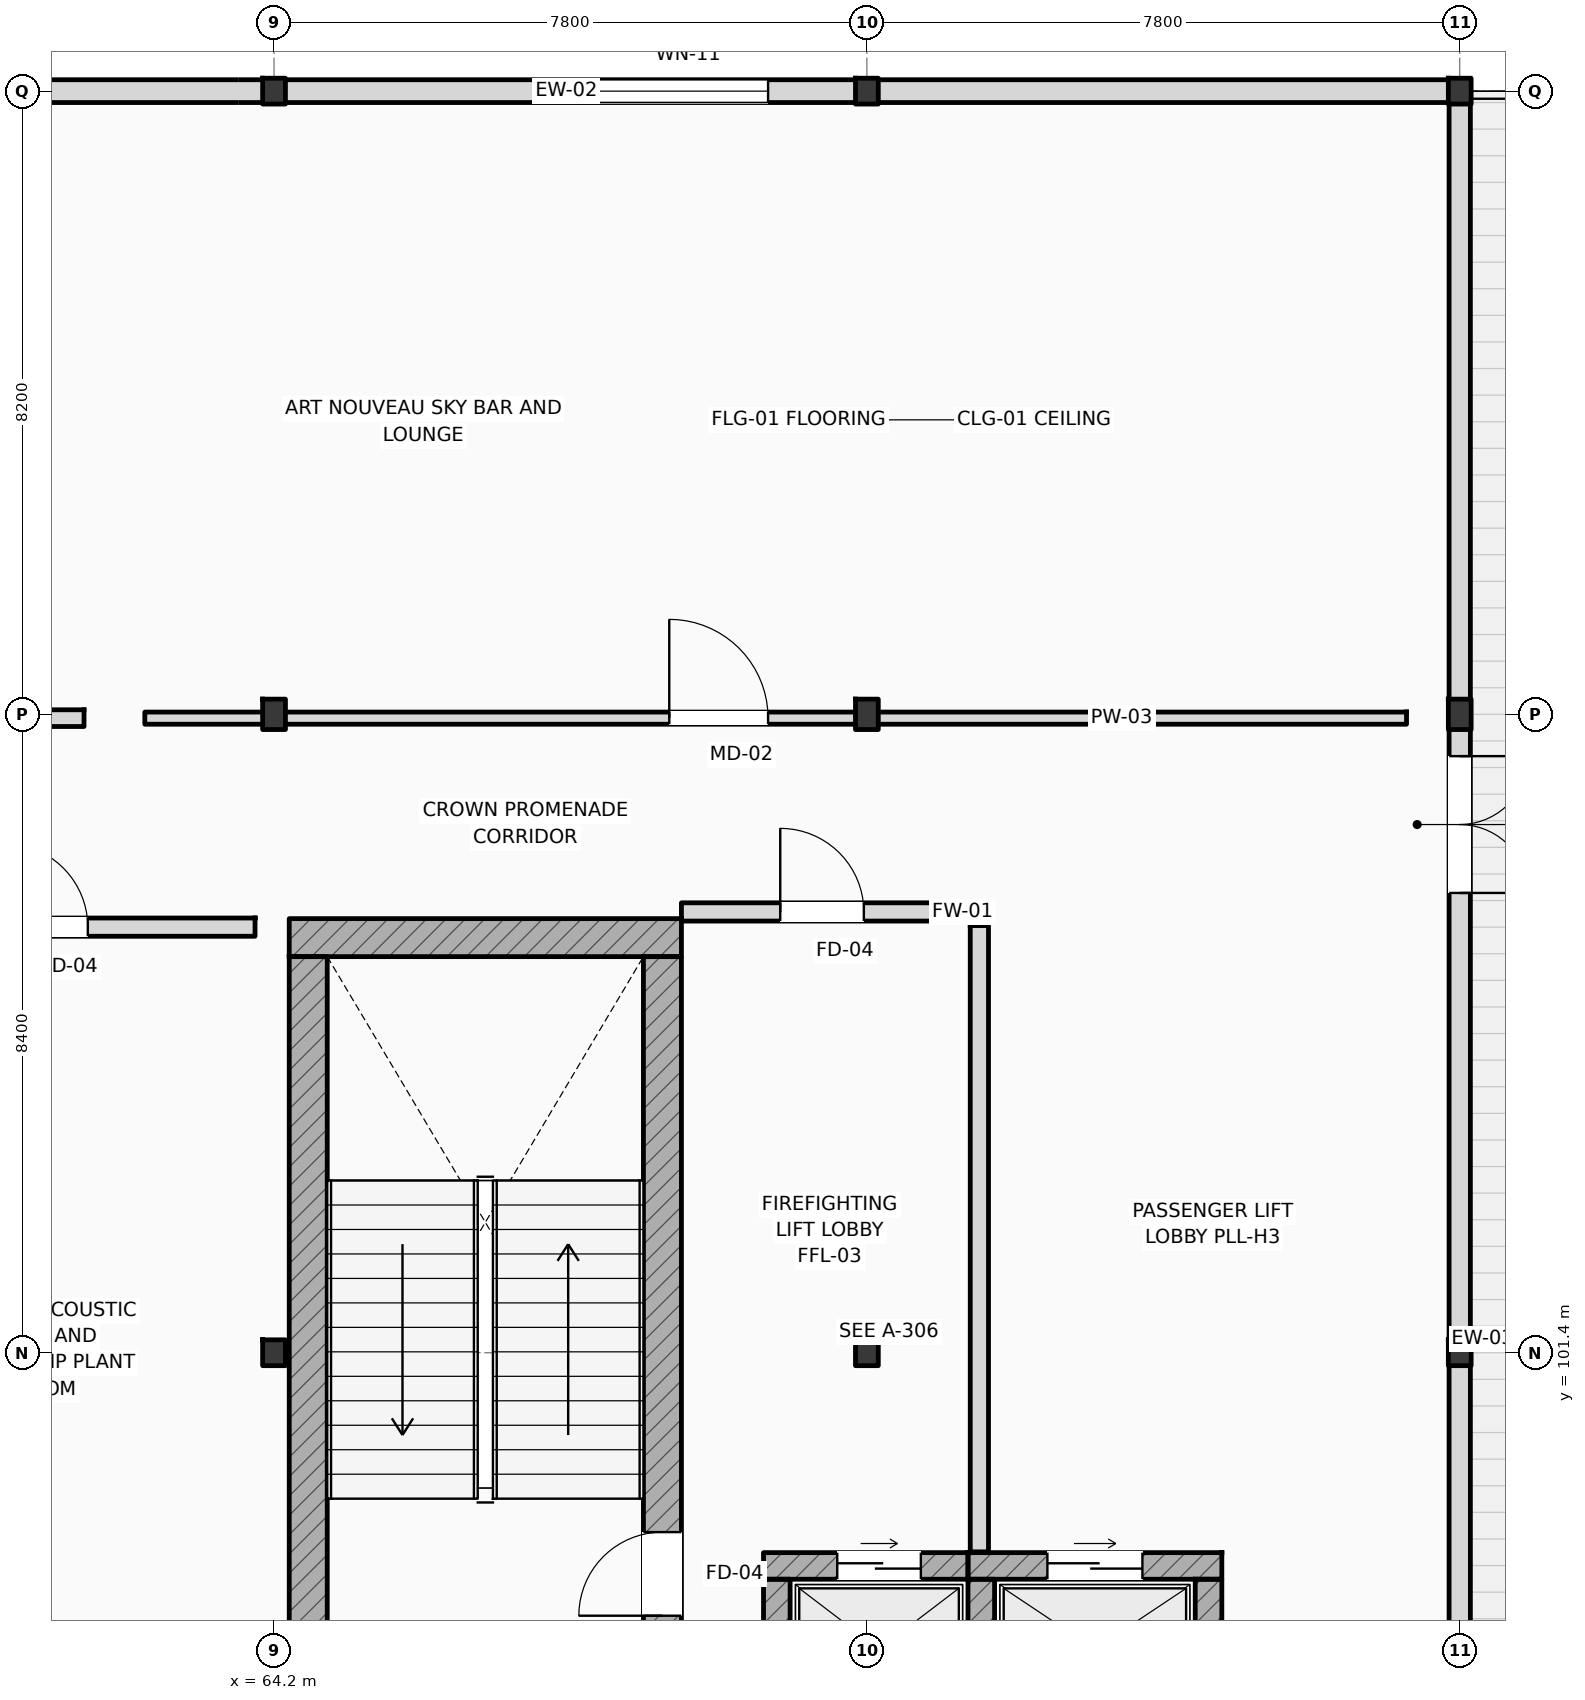
"""IFC4 building model, lengths in metres.
Left out: names, types, materials, properties, quantities, classifications, styles, units other than length and angle.
Written with IfcOpenShell. Run it as: python <this file> out.ifc"""

import sys

from ifc_helpers import new_model, si_unit, direction, frame, frame_2d, origin, origin_2d, place, context, subcontext, project, spatial, rectangle, i_section, extrude, element, fill, save


model = new_model("IFC4")
c1 = context("Model", 3, precision=1e-05, world=origin(), true_north=direction((0.0, 1.0)))
c2 = subcontext(c1, "Body", "Model", "MODEL_VIEW")
j1 = project(units=[si_unit("LENGTHUNIT", "METRE"), si_unit("PLANEANGLEUNIT", "RADIAN")], contexts=[c1])
p1 = place(None, origin())
s1 = spatial("IfcSite", under=j1, at=p1, CompositionType="ELEMENT")
p2 = place(p1, origin())
s2 = spatial("IfcBuilding", under=s1, at=p2, CompositionType="ELEMENT")
p3 = place(p2, frame((0.0, 0.0, 46.8)))
s3 = spatial("IfcBuildingStorey", under=s2, at=p3, CompositionType="ELEMENT", Elevation=46.8)
p4 = place(p3, frame((64.2, 101.4, 0.0), z_axis=(0.0, 0.0, 1.0), x_axis=(1.0, 0.0, 0.0)))
e1 = element("IfcColumn", 1, at=p4, inside=s3, PredefinedType="COLUMN", context=c2, shape_type="SweptSolid", body=[
    extrude(i_section(OverallWidth=0.3, OverallDepth=0.34, WebThickness=0.012, FlangeThickness=0.021, FilletRadius=0.027, at=origin_2d()), origin(), (0.0, 0.0, 1.0), 4.8),
])
p5 = place(p3, frame((64.2, 109.8, 0.0), z_axis=(0.0, 0.0, 1.0), x_axis=(1.0, 0.0, 0.0)))
e2 = element("IfcColumn", 2, at=p5, inside=s3, PredefinedType="COLUMN", context=c2, shape_type="SweptSolid", body=[
    extrude(i_section(OverallWidth=0.3, OverallDepth=0.4, WebThickness=0.013, FlangeThickness=0.024, FilletRadius=0.027, at=origin_2d()), origin(), (0.0, 0.0, 1.0), 4.8),
])
for number, where, z_axis, x_axis in (
    (3, (64.2, 118.0, 0.0), (0.0, 0.0, 1.0), (1.0, 0.0, 0.0)),
    (4, (72.0, 101.4, 0.0), (0.0, 0.0, 1.0), (1.0, 0.0, 0.0)),
):
    element("IfcColumn", number, at=place(p3, frame(where, z_axis=z_axis, x_axis=x_axis)), inside=s3, PredefinedType="COLUMN", context=c2, shape_type="SweptSolid", body=[
        extrude(i_section(OverallWidth=0.3, OverallDepth=0.34, WebThickness=0.012, FlangeThickness=0.021, FilletRadius=0.027, at=origin_2d()), origin(), (0.0, 0.0, 1.0), 4.8),
    ])
p6 = place(p3, frame((72.0, 109.8, 0.0), z_axis=(0.0, 0.0, 1.0), x_axis=(1.0, 0.0, 0.0)))
e5 = element("IfcColumn", 5, at=p6, inside=s3, PredefinedType="COLUMN", context=c2, shape_type="SweptSolid", body=[
    extrude(i_section(OverallWidth=0.3, OverallDepth=0.4, WebThickness=0.013, FlangeThickness=0.024, FilletRadius=0.027, at=origin_2d()), origin(), (0.0, 0.0, 1.0), 4.8),
])
for number, where, z_axis, x_axis in (
    (6, (72.0, 118.0, 0.0), (0.0, 0.0, 1.0), (1.0, 0.0, 0.0)),
    (7, (79.8, 101.4, 0.0), (0.0, 0.0, 1.0), (1.0, 0.0, 0.0)),
):
    element("IfcColumn", number, at=place(p3, frame(where, z_axis=z_axis, x_axis=x_axis)), inside=s3, PredefinedType="COLUMN", context=c2, shape_type="SweptSolid", body=[
        extrude(i_section(OverallWidth=0.3, OverallDepth=0.34, WebThickness=0.012, FlangeThickness=0.021, FilletRadius=0.027, at=origin_2d()), origin(), (0.0, 0.0, 1.0), 4.8),
    ])
p7 = place(p3, frame((79.8, 109.8, 0.0), z_axis=(0.0, 0.0, 1.0), x_axis=(1.0, 0.0, 0.0)))
e8 = element("IfcColumn", 8, at=p7, inside=s3, PredefinedType="COLUMN", context=c2, shape_type="SweptSolid", body=[
    extrude(i_section(OverallWidth=0.3, OverallDepth=0.4, WebThickness=0.013, FlangeThickness=0.024, FilletRadius=0.027, at=origin_2d()), origin(), (0.0, 0.0, 1.0), 4.8),
])
p8 = place(p3, frame((79.8, 118.0, 0.0), z_axis=(0.0, 0.0, 1.0), x_axis=(1.0, 0.0, 0.0)))
e9 = element("IfcColumn", 9, at=p8, inside=s3, PredefinedType="COLUMN", context=c2, shape_type="SweptSolid", body=[
    extrude(i_section(OverallWidth=0.3, OverallDepth=0.34, WebThickness=0.012, FlangeThickness=0.021, FilletRadius=0.027, at=origin_2d()), origin(), (0.0, 0.0, 1.0), 4.8),
])
p9 = place(p3, frame((64.4, 106.862, 0.0), z_axis=(0.0, 0.0, 1.0), x_axis=(1.0, 0.0, 0.0)))
e10 = element("IfcWall", 10, at=p9, inside=s3, PredefinedType="SHEAR", context=c2, shape_type="SweptSolid", body=[
    extrude(rectangle(XDim=5.16, YDim=0.5, at=frame_2d((2.58, 0.0))), origin(), (0.0, 0.0, 1.0), 4.8),
])
p10 = place(p3, frame((64.65, 97.5, 0.0), z_axis=(0.0, 0.0, 1.0), x_axis=(0.0, 1.0, 0.0)))
e11 = element("IfcWall", 11, at=p10, inside=s3, PredefinedType="SHEAR", context=c2, shape_type="SweptSolid", body=[
    extrude(rectangle(XDim=9.112, YDim=0.5, at=frame_2d((4.556, 0.0))), origin(), (0.0, 0.0, 1.0), 4.8),
])
p11 = place(p3, frame((69.31, 97.5, 0.0), z_axis=(0.0, 0.0, 1.0), x_axis=(0.0, 1.0, 0.0)))
e12 = element("IfcWall", 12, at=p11, inside=s3, PredefinedType="SHEAR", context=c2, shape_type="SweptSolid", body=[
    extrude(rectangle(XDim=9.112, YDim=0.5, at=frame_2d((4.556, 0.0))), origin(), (0.0, 0.0, 1.0), 4.8),
])
p12 = place(p11, frame((0.44, 0.0, 0.0)))
e13 = element("IfcOpeningElement", 13, at=p12, cuts=e12, PredefinedType="OPENING", context=c2, shape_type="SweptSolid", body=[
    extrude(rectangle(XDim=1.1, YDim=2.2, at=frame_2d((0.55, 1.1))), frame((0.0, 0.26, 0.0), z_axis=(0.0, -1.0, 0.0), x_axis=(1.0, 0.0, 0.0)), (0.0, 0.0, 1.0), 0.52),
])
p13 = place(p3, frame((22.5, 118.0, 0.0), z_axis=(0.0, 0.0, 1.0), x_axis=(1.0, 0.0, 0.0)))
e14 = element("IfcWall", 14, at=p13, inside=s3, PredefinedType="STANDARD", context=c2, shape_type="SweptSolid", body=[
    extrude(rectangle(XDim=57.3, YDim=0.3, at=frame_2d((28.65, 0.0))), origin(), (0.0, 0.0, 1.0), 4.08),
])
p14 = place(p13, frame((3.5, 0.0, 0.85)))
e15 = element("IfcOpeningElement", 15, at=p14, cuts=e14, PredefinedType="OPENING", context=c2, shape_type="SweptSolid", body=[
    extrude(rectangle(XDim=2.7, YDim=2.4, at=frame_2d((1.35, 1.2))), frame((0.0, 0.16, 0.0), z_axis=(0.0, -1.0, 0.0), x_axis=(1.0, 0.0, 0.0)), (0.0, 0.0, 1.0), 0.32),
])
p15 = place(p13, frame((19.1, 0.0, 0.85)))
e16 = element("IfcOpeningElement", 16, at=p15, cuts=e14, PredefinedType="OPENING", context=c2, shape_type="SweptSolid", body=[
    extrude(rectangle(XDim=2.7, YDim=2.4, at=frame_2d((1.35, 1.2))), frame((0.0, 0.16, 0.0), z_axis=(0.0, -1.0, 0.0), x_axis=(1.0, 0.0, 0.0)), (0.0, 0.0, 1.0), 0.32),
])
p16 = place(p13, frame((34.7, 0.0, 0.85)))
e17 = element("IfcOpeningElement", 17, at=p16, cuts=e14, PredefinedType="OPENING", context=c2, shape_type="SweptSolid", body=[
    extrude(rectangle(XDim=2.7, YDim=2.4, at=frame_2d((1.35, 1.2))), frame((0.0, 0.16, 0.0), z_axis=(0.0, -1.0, 0.0), x_axis=(1.0, 0.0, 0.0)), (0.0, 0.0, 1.0), 0.32),
])
p17 = place(p13, frame((45.5, 0.0, 0.85)))
e18 = element("IfcOpeningElement", 18, at=p17, cuts=e14, PredefinedType="OPENING", context=c2, shape_type="SweptSolid", body=[
    extrude(rectangle(XDim=2.7, YDim=2.4, at=frame_2d((1.35, 1.2))), frame((0.0, 0.16, 0.0), z_axis=(0.0, -1.0, 0.0), x_axis=(1.0, 0.0, 0.0)), (0.0, 0.0, 1.0), 0.32),
])
p18 = place(p3, frame((79.8, 96.0, 0.0), z_axis=(0.0, 0.0, 1.0), x_axis=(0.0, 1.0, 0.0)))
e19 = element("IfcWall", 19, at=p18, inside=s3, PredefinedType="STANDARD", context=c2, shape_type="SweptSolid", body=[
    extrude(rectangle(XDim=22.0, YDim=0.28, at=frame_2d((11.0, 0.0))), origin(), (0.0, 0.0, 1.0), 4.17),
])
p19 = place(p18, frame((11.45, 0.0, 0.0)))
e20 = element("IfcOpeningElement", 20, at=p19, cuts=e19, PredefinedType="OPENING", context=c2, shape_type="SweptSolid", body=[
    extrude(rectangle(XDim=1.8, YDim=2.4, at=frame_2d((0.9, 1.2))), frame((0.0, 0.15, 0.0), z_axis=(0.0, -1.0, 0.0), x_axis=(1.0, 0.0, 0.0)), (0.0, 0.0, 1.0), 0.3),
])
p20 = place(p3, frame((70.64, 98.595, 0.0), z_axis=(0.0, 0.0, 1.0), x_axis=(1.0, 0.0, 0.0)))
e21 = element("IfcWall", 21, at=p20, inside=s3, PredefinedType="SHEAR", context=c2, shape_type="SweptSolid", body=[
    extrude(rectangle(XDim=2.69, YDim=0.35, at=frame_2d((1.345, 0.0))), origin(), (0.0, 0.0, 1.0), 4.54),
])
p21 = place(p20, frame((0.97, 0.0, 0.0)))
e22 = element("IfcOpeningElement", 22, at=p21, cuts=e21, PredefinedType="OPENING", context=c2, shape_type="SweptSolid", body=[
    extrude(rectangle(XDim=1.1, YDim=2.2, at=frame_2d((0.55, 1.1))), frame((0.0, 0.185, 0.0), z_axis=(0.0, -1.0, 0.0), x_axis=(1.0, 0.0, 0.0)), (0.0, 0.0, 1.0), 0.37),
])
p22 = place(p3, frame((70.815, 96.58, 0.0), z_axis=(0.0, 0.0, 1.0), x_axis=(0.0, 1.0, 0.0)))
e23 = element("IfcWall", 23, at=p22, inside=s3, PredefinedType="SHEAR", context=c2, shape_type="SweptSolid", body=[
    extrude(rectangle(XDim=1.84, YDim=0.35, at=frame_2d((0.92, 0.0))), origin(), (0.0, 0.0, 1.0), 4.54),
])
p23 = place(p3, frame((73.33, 98.595, 0.0), z_axis=(0.0, 0.0, 1.0), x_axis=(1.0, 0.0, 0.0)))
e24 = element("IfcWall", 24, at=p23, inside=s3, PredefinedType="SHEAR", context=c2, shape_type="SweptSolid", body=[
    extrude(rectangle(XDim=3.34, YDim=0.35, at=frame_2d((1.67, 0.0))), origin(), (0.0, 0.0, 1.0), 4.54),
])
p24 = place(p23, frame((1.045, 0.0, 0.0)))
e25 = element("IfcOpeningElement", 25, at=p24, cuts=e24, PredefinedType="OPENING", context=c2, shape_type="SweptSolid", body=[
    extrude(rectangle(XDim=1.25, YDim=2.25, at=frame_2d((0.625, 1.125))), frame((0.0, 0.185, 0.0), z_axis=(0.0, -1.0, 0.0), x_axis=(1.0, 0.0, 0.0)), (0.0, 0.0, 1.0), 0.37),
])
for number, where, z_axis, x_axis in (
    (26, (73.505, 96.58, 0.0), (0.0, 0.0, 1.0), (0.0, 1.0, 0.0)),
    (27, (76.495, 96.58, 0.0), (0.0, 0.0, 1.0), (0.0, 1.0, 0.0)),
):
    element("IfcWall", number, at=place(p3, frame(where, z_axis=z_axis, x_axis=x_axis)), inside=s3, PredefinedType="SHEAR", context=c2, shape_type="SweptSolid", body=[
        extrude(rectangle(XDim=1.84, YDim=0.35, at=frame_2d((0.92, 0.0))), origin(), (0.0, 0.0, 1.0), 4.54),
    ])
p25 = place(p3, frame((73.48, 98.78, 0.0), z_axis=(0.0, 0.0, 1.0), x_axis=(0.0, 1.0, 0.0)))
e28 = element("IfcWall", 28, at=p25, inside=s3, PredefinedType="STANDARD", context=c2, shape_type="SweptSolid", body=[
    extrude(rectangle(XDim=8.24, YDim=0.24, at=frame_2d((4.12, 0.0))), origin(), (0.0, 0.0, 1.0), 4.54),
])
p26 = place(p3, frame((69.56, 107.2, 0.0), z_axis=(0.0, 0.0, 1.0), x_axis=(1.0, 0.0, 0.0)))
e29 = element("IfcWall", 29, at=p26, inside=s3, PredefinedType="STANDARD", context=c2, shape_type="SweptSolid", body=[
    extrude(rectangle(XDim=4.1, YDim=0.24, at=frame_2d((2.05, 0.0))), origin(), (0.0, 0.0, 1.0), 4.54),
])
p27 = place(p26, frame((1.3, 0.0, 0.0)))
e30 = element("IfcOpeningElement", 30, at=p27, cuts=e29, PredefinedType="OPENING", context=c2, shape_type="SweptSolid", body=[
    extrude(rectangle(XDim=1.1, YDim=2.2, at=frame_2d((0.55, 1.1))), frame((0.0, 0.13, 0.0), z_axis=(0.0, -1.0, 0.0), x_axis=(1.0, 0.0, 0.0)), (0.0, 0.0, 1.0), 0.26),
])
p28 = place(p3, frame((23.3, 109.75, 0.0), z_axis=(0.0, 0.0, 1.0), x_axis=(1.0, 0.0, 0.0)))
e31 = element("IfcWall", 31, at=p28, inside=s3, PredefinedType="PARTITIONING", context=c2, shape_type="SweptSolid", body=[
    extrude(rectangle(XDim=38.4, YDim=0.22, at=frame_2d((19.2, 0.0))), origin(), (0.0, 0.0, 1.0), 3.98),
])
p29 = place(p28, frame((18.7, 0.0, 0.0)))
e32 = element("IfcOpeningElement", 32, at=p29, cuts=e31, PredefinedType="OPENING", context=c2, shape_type="SweptSolid", body=[
    extrude(rectangle(XDim=2.0, YDim=2.35, at=frame_2d((1.0, 1.175))), frame((0.0, 0.12, 0.0), z_axis=(0.0, -1.0, 0.0), x_axis=(1.0, 0.0, 0.0)), (0.0, 0.0, 1.0), 0.24),
])
p30 = place(p3, frame((62.5, 109.75, 0.0), z_axis=(0.0, 0.0, 1.0), x_axis=(1.0, 0.0, 0.0)))
e33 = element("IfcWall", 33, at=p30, inside=s3, PredefinedType="PARTITIONING", context=c2, shape_type="SweptSolid", body=[
    extrude(rectangle(XDim=16.6, YDim=0.16, at=frame_2d((8.3, 0.0))), origin(), (0.0, 0.0, 1.0), 4.08),
])
p31 = place(p30, frame((6.9, 0.0, 0.0)))
e34 = element("IfcOpeningElement", 34, at=p31, cuts=e33, PredefinedType="OPENING", context=c2, shape_type="SweptSolid", body=[
    extrude(rectangle(XDim=1.3, YDim=2.2, at=frame_2d((0.65, 1.1))), frame((0.0, 0.09, 0.0), z_axis=(0.0, -1.0, 0.0), x_axis=(1.0, 0.0, 0.0)), (0.0, 0.0, 1.0), 0.18),
])
p32 = place(p3, frame((58.45, 107.0, 0.0), z_axis=(0.0, 0.0, 1.0), x_axis=(1.0, 0.0, 0.0)))
e35 = element("IfcWall", 35, at=p32, inside=s3, PredefinedType="STANDARD", context=c2, shape_type="SweptSolid", body=[
    extrude(rectangle(XDim=5.5, YDim=0.24, at=frame_2d((2.75, 0.0))), origin(), (0.0, 0.0, 1.0), 4.54),
])
p33 = place(p32, frame((2.2, 0.0, 0.0)))
e36 = element("IfcOpeningElement", 36, at=p33, cuts=e35, PredefinedType="OPENING", context=c2, shape_type="SweptSolid", body=[
    extrude(rectangle(XDim=1.1, YDim=2.2, at=frame_2d((0.55, 1.1))), frame((0.0, 0.13, 0.0), z_axis=(0.0, -1.0, 0.0), x_axis=(1.0, 0.0, 0.0)), (0.0, 0.0, 1.0), 0.26),
])
p34 = place(p17, origin())
e37 = element("IfcWindow", 37, at=p34, inside=s3, PartitioningType="DOUBLE_PANEL_VERTICAL", PredefinedType="WINDOW", context=c2, shape_type="SweptSolid", body=[
    extrude(rectangle(XDim=2.7, YDim=2.4, at=frame_2d((1.35, 1.2))), frame((0.0, 0.03, 0.0), z_axis=(0.0, -1.0, 0.0), x_axis=(1.0, 0.0, 0.0)), (0.0, 0.0, 1.0), 0.06),
])
fill(e18, e37)
p35 = place(p19, frame((1.8, 0.0, 0.0), z_axis=(0.0, 0.0, 1.0), x_axis=(-1.0, 0.0, 0.0)))
e38 = element("IfcDoor", 38, at=p35, inside=s3, OperationType="DOUBLE_SWING_LEFT", PredefinedType="DOOR", context=c2, shape_type="SweptSolid", body=[
    extrude(rectangle(XDim=1.8, YDim=2.4, at=frame_2d((0.9, 1.2))), frame((0.0, 0.025, 0.0), z_axis=(0.0, -1.0, 0.0), x_axis=(1.0, 0.0, 0.0)), (0.0, 0.0, 1.0), 0.05),
])
fill(e20, e38)
p36 = place(p12, origin())
e39 = element("IfcDoor", 39, at=p36, inside=s3, OperationType="SINGLE_SWING_LEFT", PredefinedType="DOOR", context=c2, shape_type="SweptSolid", body=[
    extrude(rectangle(XDim=1.1, YDim=2.2, at=frame_2d((0.55, 1.1))), frame((0.0, 0.025, 0.0), z_axis=(0.0, -1.0, 0.0), x_axis=(1.0, 0.0, 0.0)), (0.0, 0.0, 1.0), 0.05),
])
fill(e13, e39)
p37 = place(p21, origin())
e40 = element("IfcDoor", 40, at=p37, inside=s3, OperationType="SLIDING_TO_LEFT", PredefinedType="DOOR", context=c2, shape_type="SweptSolid", body=[
    extrude(rectangle(XDim=1.1, YDim=2.2, at=frame_2d((0.55, 1.1))), frame((0.0, 0.025, 0.0), z_axis=(0.0, -1.0, 0.0), x_axis=(1.0, 0.0, 0.0)), (0.0, 0.0, 1.0), 0.05),
])
fill(e22, e40)
p38 = place(p24, origin())
e41 = element("IfcDoor", 41, at=p38, inside=s3, OperationType="SLIDING_TO_LEFT", PredefinedType="DOOR", context=c2, shape_type="SweptSolid", body=[
    extrude(rectangle(XDim=1.25, YDim=2.25, at=frame_2d((0.625, 1.125))), frame((0.0, 0.025, 0.0), z_axis=(0.0, -1.0, 0.0), x_axis=(1.0, 0.0, 0.0)), (0.0, 0.0, 1.0), 0.05),
])
fill(e25, e41)
p39 = place(p27, origin())
e42 = element("IfcDoor", 42, at=p39, inside=s3, OperationType="SINGLE_SWING_LEFT", PredefinedType="DOOR", context=c2, shape_type="SweptSolid", body=[
    extrude(rectangle(XDim=1.1, YDim=2.2, at=frame_2d((0.55, 1.1))), frame((0.0, 0.025, 0.0), z_axis=(0.0, -1.0, 0.0), x_axis=(1.0, 0.0, 0.0)), (0.0, 0.0, 1.0), 0.05),
])
fill(e30, e42)
p40 = place(p31, origin())
e43 = element("IfcDoor", 43, at=p40, inside=s3, OperationType="SINGLE_SWING_LEFT", PredefinedType="DOOR", context=c2, shape_type="SweptSolid", body=[
    extrude(rectangle(XDim=1.3, YDim=2.2, at=frame_2d((0.65, 1.1))), frame((0.0, 0.025, 0.0), z_axis=(0.0, -1.0, 0.0), x_axis=(1.0, 0.0, 0.0)), (0.0, 0.0, 1.0), 0.05),
])
fill(e34, e43)
p41 = place(p33, origin())
e44 = element("IfcDoor", 44, at=p41, inside=s3, OperationType="SINGLE_SWING_LEFT", PredefinedType="DOOR", context=c2, shape_type="SweptSolid", body=[
    extrude(rectangle(XDim=1.1, YDim=2.2, at=frame_2d((0.55, 1.1))), frame((0.0, 0.025, 0.0), z_axis=(0.0, -1.0, 0.0), x_axis=(1.0, 0.0, 0.0)), (0.0, 0.0, 1.0), 0.05),
])
fill(e36, e44)
save(model, sys.argv[1])
